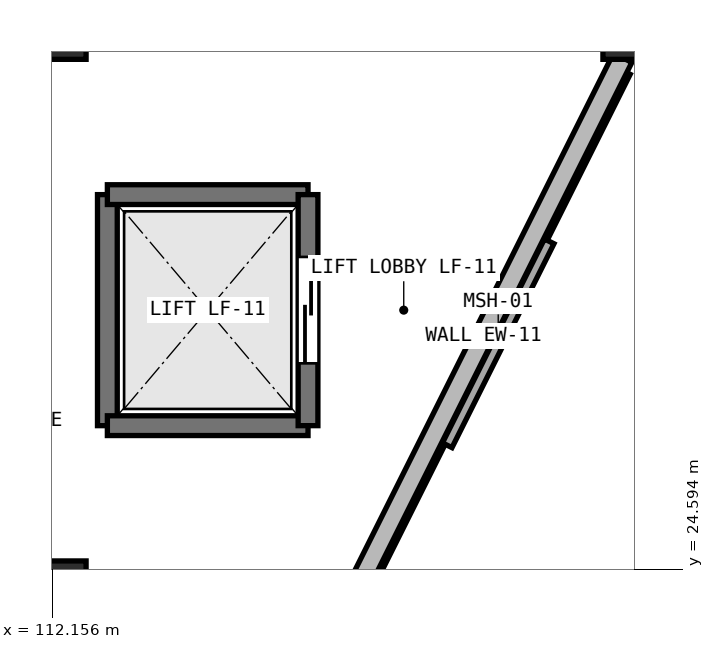
"""IFC4 building model, lengths in metres.
Left out: names, types, materials, properties, quantities, classifications, styles, units other than length and angle.
Written with IfcOpenShell. Run it as: python <this file> out.ifc"""

import sys

from ifc_helpers import new_model, si_unit, direction, frame, frame_2d, origin, origin_2d, place, context, subcontext, project, spatial, rectangle, extrude, element, fill, save


model = new_model("IFC4")
c1 = context("Model", 3, precision=1e-05, world=origin(), true_north=direction((0.0, 1.0)))
c2 = subcontext(c1, "Body", "Model", "MODEL_VIEW")
j1 = project(units=[si_unit("LENGTHUNIT", "METRE"), si_unit("PLANEANGLEUNIT", "RADIAN")], contexts=[c1])
p1 = place(None, origin())
s1 = spatial("IfcSite", under=j1, at=p1, CompositionType="ELEMENT")
p2 = place(p1, origin())
s2 = spatial("IfcBuilding", under=s1, at=p2, CompositionType="ELEMENT")
p3 = place(p2, origin())
s3 = spatial("IfcBuildingStorey", under=s2, at=p3, CompositionType="ELEMENT", Elevation=0.0)
for number, where, z_axis, x_axis in (
    (1, (112.0, 24.0, 0.0), (0.0, 0.0, 1.0), (1.0, 0.0, 0.0)),
    (2, (112.0, 32.0, 0.0), (0.0, 0.0, 1.0), (1.0, 0.0, 0.0)),
    (3, (120.0, 32.0, 0.0), (0.0, 0.0, 1.0), (1.0, 0.0, 0.0)),
):
    element("IfcColumn", number, at=place(p3, frame(where, z_axis=z_axis, x_axis=x_axis)), inside=s3, PredefinedType="COLUMN", context=c2, shape_type="SweptSolid", body=[
        extrude(rectangle(XDim=1.2, YDim=1.4, at=origin_2d()), origin(), (0.0, 0.0, 1.0), 5.4),
    ])
p4 = place(p3, frame((119.66, 31.32, 0.0), z_axis=(0.0, 0.0, 1.0), x_axis=(-0.447201662923, -0.894433157189, 0.0)))
e4 = element("IfcWall", 4, at=p4, inside=s3, PredefinedType="SOLIDWALL", context=c2, shape_type="SweptSolid", body=[
    extrude(rectangle(XDim=8.184, YDim=0.27, at=frame_2d((4.092, 0.0))), origin(), (0.0, 0.0, 1.0), 4.05),
])
p5 = place(p3, frame((112.88, 26.48, 0.0), z_axis=(0.0, 0.0, 1.0), x_axis=(0.0, 1.0, 0.0)))
e5 = element("IfcWall", 5, at=p5, inside=s3, PredefinedType="SHEAR", context=c2, shape_type="SweptSolid", body=[
    extrude(rectangle(XDim=3.04, YDim=0.26, at=frame_2d((1.52, 0.0))), origin(), (0.0, 0.0, 1.0), 5.08),
])
for number, where, z_axis, x_axis in (
    (6, (112.88, 29.52, 0.0), (0.0, 0.0, 1.0), (1.0, 0.0, 0.0)),
    (7, (115.52, 26.48, 0.0), (0.0, 0.0, 1.0), (-1.0, 0.0, 0.0)),
):
    element("IfcWall", number, at=place(p3, frame(where, z_axis=z_axis, x_axis=x_axis)), inside=s3, PredefinedType="SHEAR", context=c2, shape_type="SweptSolid", body=[
        extrude(rectangle(XDim=2.64, YDim=0.26, at=frame_2d((1.32, 0.0))), origin(), (0.0, 0.0, 1.0), 5.08),
    ])
p6 = place(p3, frame((115.52, 29.52, 0.0), z_axis=(0.0, 0.0, 1.0), x_axis=(0.0, -1.0, 0.0)))
e8 = element("IfcWall", 8, at=p6, inside=s3, PredefinedType="SHEAR", context=c2, shape_type="SweptSolid", body=[
    extrude(rectangle(XDim=3.04, YDim=0.26, at=frame_2d((1.52, 0.0))), origin(), (0.0, 0.0, 1.0), 5.08),
])
p7 = place(p6, frame((0.82, 0.0, 0.0)))
e9 = element("IfcOpeningElement", 9, at=p7, cuts=e8, PredefinedType="OPENING", context=c2, shape_type="SweptSolid", body=[
    extrude(rectangle(XDim=1.4, YDim=2.2, at=frame_2d((0.7, 1.1))), frame((0.0, 0.14, 0.0), z_axis=(0.0, -1.0, 0.0), x_axis=(1.0, 0.0, 0.0)), (0.0, 0.0, 1.0), 0.28),
])
p8 = place(p7, origin())
e10 = element("IfcDoor", 10, at=p8, inside=s3, OperationType="SLIDING_TO_LEFT", PredefinedType="DOOR", context=c2, shape_type="SweptSolid", body=[
    extrude(rectangle(XDim=1.4, YDim=2.2, at=frame_2d((0.7, 1.1))), frame((0.0, 0.025, 0.0), z_axis=(0.0, -1.0, 0.0), x_axis=(1.0, 0.0, 0.0)), (0.0, 0.0, 1.0), 0.05),
])
fill(e9, e10)
save(model, sys.argv[1])
